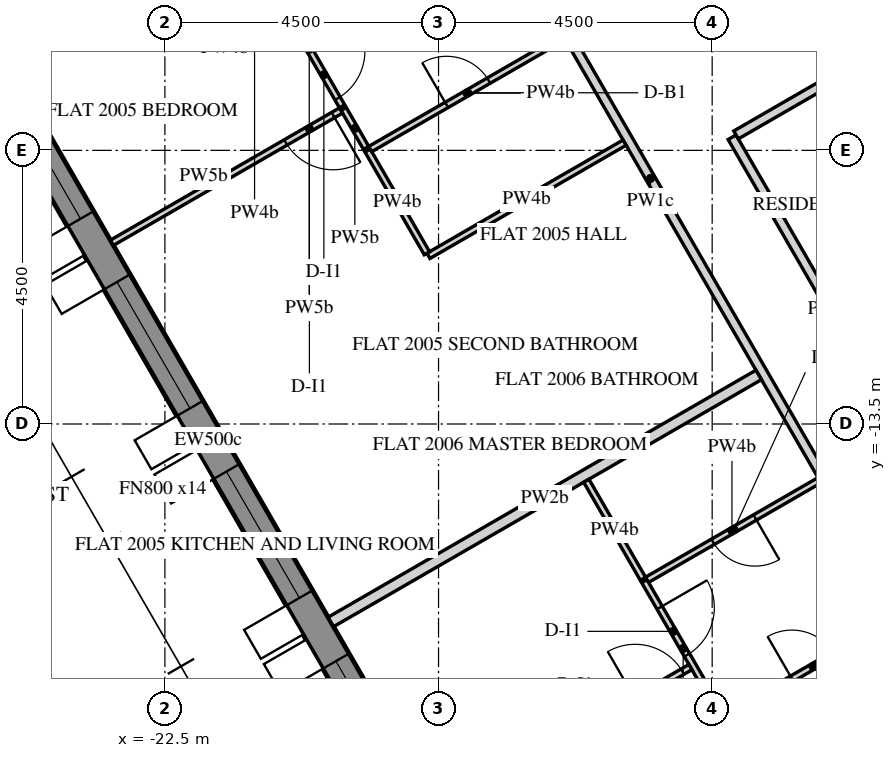
"""IFC4 building model, lengths in metres.
Left out: names, types, materials, properties, quantities, classifications, styles, units other than length and angle.
Written with IfcOpenShell. Run it as: python <this file> out.ifc"""

import sys

from ifc_helpers import new_model, si_unit, direction, frame, frame_2d, origin, place, context, subcontext, project, spatial, polyline, rectangle, outline, extrude, element, fill, save


model = new_model("IFC4")
c1 = context("Model", 3, precision=1e-05, world=origin(), true_north=direction((0.0, 1.0)))
c2 = subcontext(c1, "Body", "Model", "MODEL_VIEW")
j1 = project(units=[si_unit("LENGTHUNIT", "METRE"), si_unit("PLANEANGLEUNIT", "RADIAN")], contexts=[c1])
p1 = place(None, origin())
s1 = spatial("IfcSite", under=j1, at=p1, CompositionType="ELEMENT")
p2 = place(p1, origin())
s2 = spatial("IfcBuilding", under=s1, at=p2, CompositionType="ELEMENT")
p3 = place(p2, frame((0.0, 0.0, 256.2)))
s3 = spatial("IfcBuildingStorey", under=s2, at=p3, CompositionType="ELEMENT", Elevation=256.2)
p4 = place(p3, frame((-28.149, -2.745, 0.0), z_axis=(0.0, 0.0, 1.0), x_axis=(0.500003737743, -0.866023245787, 0.0)))
e1 = element("IfcWall", 1, at=p4, inside=s3, PredefinedType="SOLIDWALL", context=c2, shape_type="SweptSolid", body=[
    extrude(outline(polyline([(-0.021, -0.25), (25.468, -0.25), (25.421, 0.25), (0.021, 0.25), (-0.021, -0.25)])), origin(), (0.0, 0.0, 1.0), 3.75),
])
p5 = place(p4, frame((2.522, 0.0, 0.6)))
e2 = element("IfcOpeningElement", 2, at=p5, cuts=e1, PredefinedType="OPENING", context=c2, shape_type="SweptSolid", body=[
    extrude(rectangle(XDim=2.4, YDim=2.7, at=frame_2d((1.2, 1.35))), frame((0.0, 0.26, 0.0), z_axis=(0.0, -1.0, 0.0), x_axis=(1.0, 0.0, 0.0)), (0.0, 0.0, 1.0), 0.52),
])
p6 = place(p4, frame((6.122, 0.0, 0.6)))
e3 = element("IfcOpeningElement", 3, at=p6, cuts=e1, PredefinedType="OPENING", context=c2, shape_type="SweptSolid", body=[
    extrude(rectangle(XDim=2.4, YDim=2.7, at=frame_2d((1.2, 1.35))), frame((0.0, 0.26, 0.0), z_axis=(0.0, -1.0, 0.0), x_axis=(1.0, 0.0, 0.0)), (0.0, 0.0, 1.0), 0.52),
])
p7 = place(p4, frame((9.722, 0.0, 0.6)))
e4 = element("IfcOpeningElement", 4, at=p7, cuts=e1, PredefinedType="OPENING", context=c2, shape_type="SweptSolid", body=[
    extrude(rectangle(XDim=2.4, YDim=2.7, at=frame_2d((1.2, 1.35))), frame((0.0, 0.26, 0.0), z_axis=(0.0, -1.0, 0.0), x_axis=(1.0, 0.0, 0.0)), (0.0, 0.0, 1.0), 0.52),
])
p8 = place(p4, frame((13.323, 0.0, 0.6)))
e5 = element("IfcOpeningElement", 5, at=p8, cuts=e1, PredefinedType="OPENING", context=c2, shape_type="SweptSolid", body=[
    extrude(rectangle(XDim=2.4, YDim=2.7, at=frame_2d((1.2, 1.35))), frame((0.0, 0.26, 0.0), z_axis=(0.0, -1.0, 0.0), x_axis=(1.0, 0.0, 0.0)), (0.0, 0.0, 1.0), 0.52),
])
p9 = place(p4, frame((16.922, 0.0, 0.6)))
e6 = element("IfcOpeningElement", 6, at=p9, cuts=e1, PredefinedType="OPENING", context=c2, shape_type="SweptSolid", body=[
    extrude(rectangle(XDim=2.4, YDim=2.7, at=frame_2d((1.2, 1.35))), frame((0.0, 0.26, 0.0), z_axis=(0.0, -1.0, 0.0), x_axis=(1.0, 0.0, 0.0)), (0.0, 0.0, 1.0), 0.52),
])
p10 = place(p4, frame((20.522, 0.0, 0.6)))
e7 = element("IfcOpeningElement", 7, at=p10, cuts=e1, PredefinedType="OPENING", context=c2, shape_type="SweptSolid", body=[
    extrude(rectangle(XDim=2.4, YDim=2.7, at=frame_2d((1.2, 1.35))), frame((0.0, 0.26, 0.0), z_axis=(0.0, -1.0, 0.0), x_axis=(1.0, 0.0, 0.0)), (0.0, 0.0, 1.0), 0.52),
])
p11 = place(p3, frame((-12.471, 0.0, 0.0), z_axis=(0.0, 0.0, 1.0), x_axis=(0.499996419489, -0.866027470984, 0.0)))
e8 = element("IfcWall", 8, at=p11, inside=s3, PredefinedType="SHEAR", context=c2, shape_type="SweptSolid", body=[
    extrude(outline(polyline([(-0.115, -0.2), (12.586, -0.2), (12.355, 0.2), (0.115, 0.2), (-0.115, -0.2)])), origin(), (0.0, 0.0, 1.0), 3.75),
])
p12 = place(p11, frame((5.306, 0.0, 0.0)))
e9 = element("IfcOpeningElement", 9, at=p12, cuts=e8, PredefinedType="OPENING", context=c2, shape_type="SweptSolid", body=[
    extrude(rectangle(XDim=1.8, YDim=2.4, at=frame_2d((0.9, 1.2))), frame((0.0, 0.21, 0.0), z_axis=(0.0, -1.0, 0.0), x_axis=(1.0, 0.0, 0.0)), (0.0, 0.0, 1.0), 0.42),
])
p13 = place(p3, frame((-18.338, -2.838, 0.0), z_axis=(0.0, 0.0, 1.0), x_axis=(0.499999693481, -0.866025580753, 0.0)))
e10 = element("IfcWall", 10, at=p13, inside=s3, PredefinedType="PARTITIONING", context=c2, shape_type="SweptSolid", body=[
    extrude(rectangle(XDim=15.296, YDim=0.15, at=frame_2d((7.648, 0.0))), origin(), (0.0, 0.0, 1.0), 2.823),
])
p14 = place(p13, frame((2.925, 0.0, 0.0)))
e11 = element("IfcOpeningElement", 11, at=p14, cuts=e10, PredefinedType="OPENING", context=c2, shape_type="SweptSolid", body=[
    extrude(rectangle(XDim=1.0, YDim=2.1, at=frame_2d((0.5, 1.05))), frame((0.0, 0.085, 0.0), z_axis=(0.0, -1.0, 0.0), x_axis=(1.0, 0.0, 0.0)), (0.0, 0.0, 1.0), 0.17),
])
p15 = place(p13, frame((14.136, 0.0, 0.0)))
e12 = element("IfcOpeningElement", 12, at=p15, cuts=e10, PredefinedType="OPENING", context=c2, shape_type="SweptSolid", body=[
    extrude(rectangle(XDim=1.0, YDim=2.1, at=frame_2d((0.5, 1.05))), frame((0.0, 0.085, 0.0), z_axis=(0.0, -1.0, 0.0), x_axis=(1.0, 0.0, 0.0)), (0.0, 0.0, 1.0), 0.17),
])
p16 = place(p3, frame((-9.901, -14.451, 0.0), z_axis=(0.0, 0.0, 1.0), x_axis=(-0.49999161165, 0.866030246746, 0.0)))
e13 = element("IfcWall", 13, at=p16, inside=s3, PredefinedType="PARTITIONING", context=c2, shape_type="SweptSolid", body=[
    extrude(rectangle(XDim=6.543, YDim=0.15, at=frame_2d((3.271, 0.0))), origin(), (0.0, 0.0, 1.0), 2.823),
])
p17 = place(p3, frame((-13.108, -8.747, 0.0), z_axis=(0.0, 0.0, 1.0), x_axis=(0.866024684746, 0.500001245408, 0.0)))
e14 = element("IfcWall", 14, at=p17, inside=s3, PredefinedType="PARTITIONING", context=c2, shape_type="SweptSolid", body=[
    extrude(rectangle(XDim=4.725, YDim=0.15, at=frame_2d((2.363, 0.0))), origin(), (0.0, 0.0, 1.0), 2.823),
])
p18 = place(p3, frame((-19.191, -8.96, 0.0), z_axis=(0.0, 0.0, 1.0), x_axis=(-0.500036104519, 0.866004557827, 0.0)))
e15 = element("IfcWall", 15, at=p18, inside=s3, PredefinedType="PARTITIONING", context=c2, shape_type="SweptSolid", body=[
    extrude(rectangle(XDim=0.741, YDim=0.1, at=frame_2d((0.371, 0.0))), origin(), (0.0, 0.0, 1.0), 2.823),
])
p19 = place(p3, frame((-19.604, -8.345, 0.0), z_axis=(0.0, 0.0, 1.0), x_axis=(-0.866027639635, -0.499996127374, 0.0)))
e16 = element("IfcWall", 16, at=p19, inside=s3, PredefinedType="PARTITIONING", context=c2, shape_type="SweptSolid", body=[
    extrude(rectangle(XDim=4.35, YDim=0.1, at=frame_2d((2.175, 0.0))), origin(), (0.0, 0.0, 1.0), 2.823),
])
p20 = place(p19, frame((0.15, 0.0, 0.0)))
e17 = element("IfcOpeningElement", 17, at=p20, cuts=e16, PredefinedType="OPENING", context=c2, shape_type="SweptSolid", body=[
    extrude(rectangle(XDim=0.9, YDim=2.1, at=frame_2d((0.45, 1.05))), frame((0.0, 0.06, 0.0), z_axis=(0.0, -1.0, 0.0), x_axis=(1.0, 0.0, 0.0)), (0.0, 0.0, 1.0), 0.12),
])
p21 = place(p3, frame((-14.94, -8.873, 0.0), z_axis=(0.0, 0.0, 1.0), x_axis=(-0.866056803351, -0.499945610411, 0.0)))
e18 = element("IfcWall", 18, at=p21, inside=s3, PredefinedType="PARTITIONING", context=c2, shape_type="SweptSolid", body=[
    extrude(rectangle(XDim=3.725, YDim=0.1, at=frame_2d((1.863, 0.0))), origin(), (0.0, 0.0, 1.0), 2.823),
])
p22 = place(p3, frame((-18.191, -10.692, 0.0), z_axis=(0.0, 0.0, 1.0), x_axis=(-0.500043961785, 0.866000020948, 0.0)))
e19 = element("IfcWall", 19, at=p22, inside=s3, PredefinedType="PARTITIONING", context=c2, shape_type="SweptSolid", body=[
    extrude(rectangle(XDim=1.95, YDim=0.1, at=frame_2d((0.975, 0.0))), origin(), (0.0, 0.0, 1.0), 2.823),
])
p23 = place(p3, frame((-19.771, -16.755, 0.0), z_axis=(0.0, 0.0, 1.0), x_axis=(0.866022959057, 0.500004234368, 0.0)))
e20 = element("IfcWall", 20, at=p23, inside=s3, PredefinedType="PARTITIONING", context=c2, shape_type="SweptSolid", body=[
    extrude(rectangle(XDim=8.125, YDim=0.18, at=frame_2d((4.062, 0.0))), origin(), (0.0, 0.0, 1.0), 2.823),
])
p24 = place(p3, frame((-20.667, -6.403, 0.0), z_axis=(0.0, 0.0, 1.0), x_axis=(0.499999270699, -0.866025824846, 0.0)))
e21 = element("IfcWall", 21, at=p24, inside=s3, PredefinedType="PARTITIONING", context=c2, shape_type="SweptSolid", body=[
    extrude(rectangle(XDim=2.163, YDim=0.1, at=frame_2d((1.082, 0.0))), origin(), (0.0, 0.0, 1.0), 2.823),
])
p25 = place(p24, frame((1.113, 0.0, 0.0)))
e22 = element("IfcOpeningElement", 22, at=p25, cuts=e21, PredefinedType="OPENING", context=c2, shape_type="SweptSolid", body=[
    extrude(rectangle(XDim=0.9, YDim=2.1, at=frame_2d((0.45, 1.05))), frame((0.0, 0.06, 0.0), z_axis=(0.0, -1.0, 0.0), x_axis=(1.0, 0.0, 0.0)), (0.0, 0.0, 1.0), 0.12),
])
p26 = place(p3, frame((-19.123, -8.978, 0.0), z_axis=(0.0, 0.0, 1.0), x_axis=(0.866006363297, 0.500032977642, 0.0)))
e23 = element("IfcWall", 23, at=p26, inside=s3, PredefinedType="PARTITIONING", context=c2, shape_type="SweptSolid", body=[
    extrude(rectangle(XDim=3.675, YDim=0.1, at=frame_2d((1.837, 0.0))), origin(), (0.0, 0.0, 1.0), 2.823),
])
p27 = place(p26, frame((1.45, 0.0, 0.0)))
e24 = element("IfcOpeningElement", 24, at=p27, cuts=e23, PredefinedType="OPENING", context=c2, shape_type="SweptSolid", body=[
    extrude(rectangle(XDim=0.8, YDim=2.1, at=frame_2d((0.4, 1.05))), frame((0.0, 0.06, 0.0), z_axis=(0.0, -1.0, 0.0), x_axis=(1.0, 0.0, 0.0)), (0.0, 0.0, 1.0), 0.12),
])
p28 = place(p3, frame((-25.171, -7.402, 0.0), z_axis=(0.0, 0.0, 1.0), x_axis=(0.866013608182, 0.500020430026, 0.0)))
e25 = element("IfcWall", 25, at=p28, inside=s3, PredefinedType="PARTITIONING", context=c2, shape_type="SweptSolid", body=[
    extrude(rectangle(XDim=4.35, YDim=0.1, at=frame_2d((2.175, 0.0))), origin(), (0.0, 0.0, 1.0), 2.823),
])
p29 = place(p28, frame((3.3, 0.0, 0.0)))
e26 = element("IfcOpeningElement", 26, at=p29, cuts=e25, PredefinedType="OPENING", context=c2, shape_type="SweptSolid", body=[
    extrude(rectangle(XDim=0.9, YDim=2.1, at=frame_2d((0.45, 1.05))), frame((0.0, 0.06, 0.0), z_axis=(0.0, -1.0, 0.0), x_axis=(1.0, 0.0, 0.0)), (0.0, 0.0, 1.0), 0.12),
])
p30 = place(p3, frame((-4.831, -15.75, 0.0), z_axis=(0.0, 0.0, 1.0), x_axis=(-0.866012441049, -0.500022451445, 0.0)))
e27 = element("IfcWall", 27, at=p30, inside=s3, PredefinedType="PARTITIONING", context=c2, shape_type="SweptSolid", body=[
    extrude(rectangle(XDim=8.641, YDim=0.1, at=frame_2d((4.321, 0.0))), origin(), (0.0, 0.0, 1.0), 2.823),
])
p31 = place(p3, frame((-11.735, -14.425, 0.0), z_axis=(0.0, 0.0, 1.0), x_axis=(-0.866033959199, -0.499985181294, 0.0)))
e28 = element("IfcWall", 28, at=p31, inside=s3, PredefinedType="PARTITIONING", context=c2, shape_type="SweptSolid", body=[
    extrude(rectangle(XDim=3.325, YDim=0.1, at=frame_2d((1.662, 0.0))), origin(), (0.0, 0.0, 1.0), 2.823),
])
p32 = place(p31, frame((1.225, 0.0, 0.0)))
e29 = element("IfcOpeningElement", 29, at=p32, cuts=e28, PredefinedType="OPENING", context=c2, shape_type="SweptSolid", body=[
    extrude(rectangle(XDim=0.8, YDim=2.1, at=frame_2d((0.4, 1.05))), frame((0.0, 0.06, 0.0), z_axis=(0.0, -1.0, 0.0), x_axis=(1.0, 0.0, 0.0)), (0.0, 0.0, 1.0), 0.12),
])
p33 = place(p3, frame((-14.615, -16.085, 0.0), z_axis=(0.0, 0.0, 1.0), x_axis=(0.499943114462, -0.866058244174, 0.0)))
e30 = element("IfcWall", 30, at=p33, inside=s3, PredefinedType="PARTITIONING", context=c2, shape_type="SweptSolid", body=[
    extrude(rectangle(XDim=2.554, YDim=0.1, at=frame_2d((1.277, 0.0))), origin(), (0.0, 0.0, 1.0), 2.823),
])
p34 = place(p33, frame((0.502, 0.0, 0.0)))
e31 = element("IfcOpeningElement", 31, at=p34, cuts=e30, PredefinedType="OPENING", context=c2, shape_type="SweptSolid", body=[
    extrude(rectangle(XDim=0.9, YDim=2.1, at=frame_2d((0.45, 1.05))), frame((0.0, 0.06, 0.0), z_axis=(0.0, -1.0, 0.0), x_axis=(1.0, 0.0, 0.0)), (0.0, 0.0, 1.0), 0.12),
])
p35 = place(p3, frame((-13.314, -18.339, 0.0), z_axis=(0.0, 0.0, 1.0), x_axis=(0.866020827114, 0.500007926942, 0.0)))
e32 = element("IfcWall", 32, at=p35, inside=s3, PredefinedType="PARTITIONING", context=c2, shape_type="SweptSolid", body=[
    extrude(rectangle(XDim=4.541, YDim=0.1, at=frame_2d((2.27, 0.0))), origin(), (0.0, 0.0, 1.0), 2.823),
])
p36 = place(p35, frame((1.3, 0.0, 0.0)))
e33 = element("IfcOpeningElement", 33, at=p36, cuts=e32, PredefinedType="OPENING", context=c2, shape_type="SweptSolid", body=[
    extrude(rectangle(XDim=0.8, YDim=2.1, at=frame_2d((0.4, 1.05))), frame((0.0, 0.06, 0.0), z_axis=(0.0, -1.0, 0.0), x_axis=(1.0, 0.0, 0.0)), (0.0, 0.0, 1.0), 0.12),
])
p37 = place(p3, frame((-15.569, -14.433, 0.0), z_axis=(0.0, 0.0, 1.0), x_axis=(0.499960808225, -0.866048029984, 0.0)))
e34 = element("IfcWall", 34, at=p37, inside=s3, PredefinedType="PARTITIONING", context=c2, shape_type="SweptSolid", body=[
    extrude(rectangle(XDim=1.862, YDim=0.1, at=frame_2d((0.931, 0.0))), origin(), (0.0, 0.0, 1.0), 2.823),
])
p38 = place(p3, frame((-17.971, -19.873, 0.0), z_axis=(0.0, 0.0, 1.0), x_axis=(0.866020389056, 0.500008685663, 0.0)))
e35 = element("IfcWall", 35, at=p38, inside=s3, PredefinedType="PARTITIONING", context=c2, shape_type="SweptSolid", body=[
    extrude(rectangle(XDim=4.75, YDim=0.1, at=frame_2d((2.375, 0.0))), origin(), (0.0, 0.0, 1.0), 2.823),
])
p39 = place(p38, frame((3.7, 0.0, 0.0)))
e36 = element("IfcOpeningElement", 36, at=p39, cuts=e35, PredefinedType="OPENING", context=c2, shape_type="SweptSolid", body=[
    extrude(rectangle(XDim=0.9, YDim=2.1, at=frame_2d((0.45, 1.05))), frame((0.0, 0.06, 0.0), z_axis=(0.0, -1.0, 0.0), x_axis=(1.0, 0.0, 0.0)), (0.0, 0.0, 1.0), 0.12),
])
p40 = place(p6, frame((0.0, 0.18, 0.0)))
e37 = element("IfcWindow", 37, at=p40, inside=s3, PartitioningType="DOUBLE_PANEL_VERTICAL", PredefinedType="WINDOW", context=c2, shape_type="SweptSolid", body=[
    extrude(rectangle(XDim=2.4, YDim=2.7, at=frame_2d((1.2, 1.35))), frame((0.0, 0.03, 0.0), z_axis=(0.0, -1.0, 0.0), x_axis=(1.0, 0.0, 0.0)), (0.0, 0.0, 1.0), 0.06),
])
fill(e3, e37)
p41 = place(p7, frame((0.0, 0.18, 0.0)))
e38 = element("IfcWindow", 38, at=p41, inside=s3, PartitioningType="DOUBLE_PANEL_VERTICAL", PredefinedType="WINDOW", context=c2, shape_type="SweptSolid", body=[
    extrude(rectangle(XDim=2.4, YDim=2.7, at=frame_2d((1.2, 1.35))), frame((0.0, 0.03, 0.0), z_axis=(0.0, -1.0, 0.0), x_axis=(1.0, 0.0, 0.0)), (0.0, 0.0, 1.0), 0.06),
])
fill(e4, e38)
p42 = place(p8, frame((0.0, 0.18, 0.0)))
e39 = element("IfcWindow", 39, at=p42, inside=s3, PartitioningType="DOUBLE_PANEL_VERTICAL", PredefinedType="WINDOW", context=c2, shape_type="SweptSolid", body=[
    extrude(rectangle(XDim=2.4, YDim=2.7, at=frame_2d((1.2, 1.35))), frame((0.0, 0.03, 0.0), z_axis=(0.0, -1.0, 0.0), x_axis=(1.0, 0.0, 0.0)), (0.0, 0.0, 1.0), 0.06),
])
fill(e5, e39)
p43 = place(p9, frame((0.0, 0.18, 0.0)))
e40 = element("IfcWindow", 40, at=p43, inside=s3, PartitioningType="DOUBLE_PANEL_VERTICAL", PredefinedType="WINDOW", context=c2, shape_type="SweptSolid", body=[
    extrude(rectangle(XDim=2.4, YDim=2.7, at=frame_2d((1.2, 1.35))), frame((0.0, 0.03, 0.0), z_axis=(0.0, -1.0, 0.0), x_axis=(1.0, 0.0, 0.0)), (0.0, 0.0, 1.0), 0.06),
])
fill(e6, e40)
p44 = place(p25, origin())
e41 = element("IfcDoor", 41, at=p44, inside=s3, OperationType="SINGLE_SWING_RIGHT", PredefinedType="DOOR", context=c2, shape_type="SweptSolid", body=[
    extrude(rectangle(XDim=0.9, YDim=2.1, at=frame_2d((0.45, 1.05))), frame((0.0, 0.025, 0.0), z_axis=(0.0, -1.0, 0.0), x_axis=(1.0, 0.0, 0.0)), (0.0, 0.0, 1.0), 0.05),
])
fill(e22, e41)
p45 = place(p20, origin())
e42 = element("IfcDoor", 42, at=p45, inside=s3, OperationType="SINGLE_SWING_RIGHT", PredefinedType="DOOR", context=c2, shape_type="SweptSolid", body=[
    extrude(rectangle(XDim=0.9, YDim=2.1, at=frame_2d((0.45, 1.05))), frame((0.0, 0.025, 0.0), z_axis=(0.0, -1.0, 0.0), x_axis=(1.0, 0.0, 0.0)), (0.0, 0.0, 1.0), 0.05),
])
fill(e17, e42)
p46 = place(p27, origin())
e43 = element("IfcDoor", 43, at=p46, inside=s3, OperationType="SINGLE_SWING_LEFT", PredefinedType="DOOR", context=c2, shape_type="SweptSolid", body=[
    extrude(rectangle(XDim=0.8, YDim=2.1, at=frame_2d((0.4, 1.05))), frame((0.0, 0.025, 0.0), z_axis=(0.0, -1.0, 0.0), x_axis=(1.0, 0.0, 0.0)), (0.0, 0.0, 1.0), 0.05),
])
fill(e24, e43)
p47 = place(p32, origin())
e44 = element("IfcDoor", 44, at=p47, inside=s3, OperationType="SINGLE_SWING_RIGHT", PredefinedType="DOOR", context=c2, shape_type="SweptSolid", body=[
    extrude(rectangle(XDim=0.8, YDim=2.1, at=frame_2d((0.4, 1.05))), frame((0.0, 0.025, 0.0), z_axis=(0.0, -1.0, 0.0), x_axis=(1.0, 0.0, 0.0)), (0.0, 0.0, 1.0), 0.05),
])
fill(e29, e44)
p48 = place(p34, origin())
e45 = element("IfcDoor", 45, at=p48, inside=s3, OperationType="SINGLE_SWING_LEFT", PredefinedType="DOOR", context=c2, shape_type="SweptSolid", body=[
    extrude(rectangle(XDim=0.9, YDim=2.1, at=frame_2d((0.45, 1.05))), frame((0.0, 0.025, 0.0), z_axis=(0.0, -1.0, 0.0), x_axis=(1.0, 0.0, 0.0)), (0.0, 0.0, 1.0), 0.05),
])
fill(e31, e45)
p49 = place(p39, origin())
e46 = element("IfcDoor", 46, at=p49, inside=s3, OperationType="SINGLE_SWING_RIGHT", PredefinedType="DOOR", context=c2, shape_type="SweptSolid", body=[
    extrude(rectangle(XDim=0.9, YDim=2.1, at=frame_2d((0.45, 1.05))), frame((0.0, 0.025, 0.0), z_axis=(0.0, -1.0, 0.0), x_axis=(1.0, 0.0, 0.0)), (0.0, 0.0, 1.0), 0.05),
])
fill(e36, e46)
p50 = place(p36, origin())
e47 = element("IfcDoor", 47, at=p50, inside=s3, OperationType="SINGLE_SWING_RIGHT", PredefinedType="DOOR", context=c2, shape_type="SweptSolid", body=[
    extrude(rectangle(XDim=0.8, YDim=2.1, at=frame_2d((0.4, 1.05))), frame((0.0, 0.025, 0.0), z_axis=(0.0, -1.0, 0.0), x_axis=(1.0, 0.0, 0.0)), (0.0, 0.0, 1.0), 0.05),
])
fill(e33, e47)
save(model, sys.argv[1])
